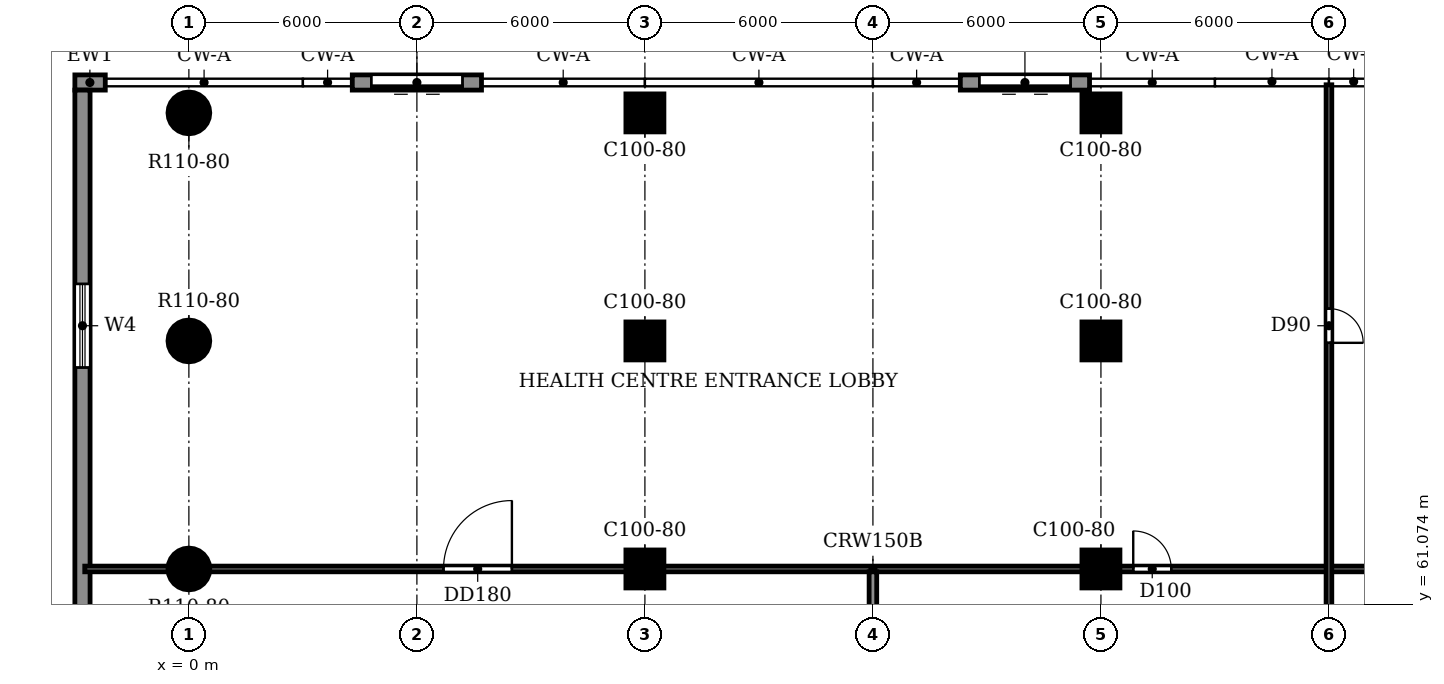
"""IFC4 building model, lengths in metres.
Left out: names, types, materials, properties, quantities, classifications, styles, units other than length and angle.
Written with IfcOpenShell. Run it as: python <this file> out.ifc"""

import sys

from ifc_helpers import new_model, si_unit, direction, frame, frame_2d, origin, origin_2d, place, context, subcontext, project, spatial, rectangle, circle, extrude, source, transform, mapped, element, fill, save


model = new_model("IFC4")
c1 = context("Model", 3, precision=1e-05, world=origin(), true_north=direction((0.0, 1.0)))
c2 = subcontext(c1, "Body", "Model", "MODEL_VIEW")
j1 = project(units=[si_unit("LENGTHUNIT", "METRE"), si_unit("PLANEANGLEUNIT", "RADIAN")], contexts=[c1])
p1 = place(None, origin())
s1 = spatial("IfcSite", under=j1, at=p1, CompositionType="ELEMENT")
p2 = place(p1, origin())
s2 = spatial("IfcBuilding", under=s1, at=p2, CompositionType="ELEMENT")
p3 = place(p2, origin())
s3 = spatial("IfcBuildingStorey", under=s2, at=p3, CompositionType="ELEMENT", Elevation=0.0)
m1 = source(origin(), c2, "Body", "SweptSolid", [
    extrude(circle(Radius=0.55, at=origin_2d()), origin(), (0.0, 0.0, 1.0), 5.98),
])
p4 = place(p3, frame((0.0, 74.0, -0.3), z_axis=(0.0, 0.0, 1.0), x_axis=(1.0, 0.0, 0.0)))
e1 = element("IfcColumn", 1, at=p4, inside=s3, PredefinedType="COLUMN", context=c2, shape_type="MappedRepresentation", body=[
    mapped(m1, transform((0.0, 0.0, 0.0))),
])
m2 = source(origin(), c2, "Body", "SweptSolid", [
    extrude(rectangle(XDim=1.0, YDim=1.0, at=origin_2d()), origin(), (0.0, 0.0, 1.0), 5.98),
])
for number, where, z_axis, x_axis in (
    (2, (12.0, 74.0, -0.3), (0.0, 0.0, 1.0), (1.0, 0.0, 0.0)),
    (3, (24.0, 74.0, -0.3), (0.0, 0.0, 1.0), (1.0, 0.0, 0.0)),
):
    element("IfcColumn", number, at=place(p3, frame(where, z_axis=z_axis, x_axis=x_axis)), inside=s3, PredefinedType="COLUMN", context=c2, shape_type="MappedRepresentation", body=[
        mapped(m2, transform((0.0, 0.0, 0.0))),
    ])
p5 = place(p3, frame((0.0, 68.0, -0.3), z_axis=(0.0, 0.0, 1.0), x_axis=(1.0, 0.0, 0.0)))
e4 = element("IfcColumn", 4, at=p5, inside=s3, PredefinedType="COLUMN", context=c2, shape_type="MappedRepresentation", body=[
    mapped(m1, transform((0.0, 0.0, 0.0))),
])
for number, where, z_axis, x_axis in (
    (5, (12.0, 68.0, -0.3), (0.0, 0.0, 1.0), (1.0, 0.0, 0.0)),
    (6, (24.0, 68.0, -0.3), (0.0, 0.0, 1.0), (1.0, 0.0, 0.0)),
):
    element("IfcColumn", number, at=place(p3, frame(where, z_axis=z_axis, x_axis=x_axis)), inside=s3, PredefinedType="COLUMN", context=c2, shape_type="MappedRepresentation", body=[
        mapped(m2, transform((0.0, 0.0, 0.0))),
    ])
p6 = place(p3, frame((0.0, 62.0, -0.3), z_axis=(0.0, 0.0, 1.0), x_axis=(1.0, 0.0, 0.0)))
e7 = element("IfcColumn", 7, at=p6, inside=s3, PredefinedType="COLUMN", context=c2, shape_type="MappedRepresentation", body=[
    mapped(m1, transform((0.0, 0.0, 0.0))),
])
for number, where, z_axis, x_axis in (
    (8, (12.0, 62.0, -0.3), (0.0, 0.0, 1.0), (1.0, 0.0, 0.0)),
    (9, (24.0, 62.0, -0.3), (0.0, 0.0, 1.0), (1.0, 0.0, 0.0)),
):
    element("IfcColumn", number, at=place(p3, frame(where, z_axis=z_axis, x_axis=x_axis)), inside=s3, PredefinedType="COLUMN", context=c2, shape_type="MappedRepresentation", body=[
        mapped(m2, transform((0.0, 0.0, 0.0))),
    ])
p7 = place(p3, frame((23.7, 74.8, 0.0), z_axis=(0.0, 0.0, 1.0), x_axis=(-1.0, 0.0, 0.0)))
e10 = element("IfcWall", 10, at=p7, inside=s3, PredefinedType="STANDARD", context=c2, shape_type="SweptSolid", body=[
    extrude(rectangle(XDim=3.4, YDim=0.4, at=frame_2d((1.7, 0.0))), origin(), (0.0, 0.0, 1.0), 5.68),
])
p8 = place(p7, frame((0.5, 0.0, 0.0)))
e11 = element("IfcOpeningElement", 11, at=p8, cuts=e10, PredefinedType="OPENING", context=c2, shape_type="SweptSolid", body=[
    extrude(rectangle(XDim=2.4, YDim=2.4, at=frame_2d((1.2, 1.2))), frame((0.0, 0.21, 0.0), z_axis=(0.0, -1.0, 0.0), x_axis=(1.0, 0.0, 0.0)), (0.0, 0.0, 1.0), 0.42),
])
p9 = place(p3, frame((7.7, 74.8, 0.0), z_axis=(0.0, 0.0, 1.0), x_axis=(-1.0, 0.0, 0.0)))
e12 = element("IfcWall", 12, at=p9, inside=s3, PredefinedType="STANDARD", context=c2, shape_type="SweptSolid", body=[
    extrude(rectangle(XDim=3.4, YDim=0.4, at=frame_2d((1.7, 0.0))), origin(), (0.0, 0.0, 1.0), 5.68),
])
p10 = place(p9, frame((0.5, 0.0, 0.0)))
e13 = element("IfcOpeningElement", 13, at=p10, cuts=e12, PredefinedType="OPENING", context=c2, shape_type="SweptSolid", body=[
    extrude(rectangle(XDim=2.4, YDim=2.4, at=frame_2d((1.2, 1.2))), frame((0.0, 0.21, 0.0), z_axis=(0.0, -1.0, 0.0), x_axis=(1.0, 0.0, 0.0)), (0.0, 0.0, 1.0), 0.42),
])
p11 = place(p3, frame((-2.2, 74.8, 0.0), z_axis=(0.0, 0.0, 1.0), x_axis=(-1.0, 0.0, 0.0)))
e14 = element("IfcWall", 14, at=p11, inside=s3, PredefinedType="STANDARD", context=c2, shape_type="SweptSolid", body=[
    extrude(rectangle(XDim=0.8, YDim=0.4, at=frame_2d((0.4, 0.0))), origin(), (0.0, 0.0, 1.0), 5.68),
])
p12 = place(p3, frame((-2.8, 74.6, 0.0), z_axis=(0.0, 0.0, 1.0), x_axis=(0.0, -1.0, 0.0)))
e15 = element("IfcWall", 15, at=p12, inside=s3, PredefinedType="STANDARD", context=c2, shape_type="SweptSolid", body=[
    extrude(rectangle(XDim=74.4, YDim=0.4, at=frame_2d((37.2, 0.0))), origin(), (0.0, 0.0, 1.0), 5.68),
])
p13 = place(p12, frame((5.1, 0.0, 0.9)))
e16 = element("IfcOpeningElement", 16, at=p13, cuts=e15, PredefinedType="OPENING", context=c2, shape_type="SweptSolid", body=[
    extrude(rectangle(XDim=2.2, YDim=2.7, at=frame_2d((1.1, 1.35))), frame((0.0, 0.21, 0.0), z_axis=(0.0, -1.0, 0.0), x_axis=(1.0, 0.0, 0.0)), (0.0, 0.0, 1.0), 0.42),
])
p14 = place(p12, frame((34.7, 0.0, 0.9)))
e17 = element("IfcOpeningElement", 17, at=p14, cuts=e15, PredefinedType="OPENING", context=c2, shape_type="SweptSolid", body=[
    extrude(rectangle(XDim=2.2, YDim=2.7, at=frame_2d((1.1, 1.35))), frame((0.0, 0.21, 0.0), z_axis=(0.0, -1.0, 0.0), x_axis=(1.0, 0.0, 0.0)), (0.0, 0.0, 1.0), 0.42),
])
p15 = place(p12, frame((20.1, 0.0, 0.9)))
e18 = element("IfcOpeningElement", 18, at=p15, cuts=e15, PredefinedType="OPENING", context=c2, shape_type="SweptSolid", body=[
    extrude(rectangle(XDim=2.2, YDim=2.7, at=frame_2d((1.1, 1.35))), frame((0.0, 0.21, 0.0), z_axis=(0.0, -1.0, 0.0), x_axis=(1.0, 0.0, 0.0)), (0.0, 0.0, 1.0), 0.42),
])
p16 = place(p12, frame((42.0, 0.0, 0.0)))
e19 = element("IfcOpeningElement", 19, at=p16, cuts=e15, PredefinedType="OPENING", context=c2, shape_type="SweptSolid", body=[
    extrude(rectangle(XDim=2.0, YDim=2.4, at=frame_2d((1.0, 1.2))), frame((0.0, 0.21, 0.0), z_axis=(0.0, -1.0, 0.0), x_axis=(1.0, 0.0, 0.0)), (0.0, 0.0, 1.0), 0.42),
])
p17 = place(p12, frame((57.7, 0.0, 0.0)))
e20 = element("IfcOpeningElement", 20, at=p17, cuts=e15, PredefinedType="OPENING", context=c2, shape_type="SweptSolid", body=[
    extrude(rectangle(XDim=2.0, YDim=2.4, at=frame_2d((1.0, 1.2))), frame((0.0, 0.21, 0.0), z_axis=(0.0, -1.0, 0.0), x_axis=(1.0, 0.0, 0.0)), (0.0, 0.0, 1.0), 0.42),
])
p18 = place(p3, frame((-2.74, 62.0, 0.0), z_axis=(0.0, 0.0, 1.0), x_axis=(1.0, 0.0, 0.0)))
e21 = element("IfcWall", 21, at=p18, inside=s3, PredefinedType="PARTITIONING", context=c2, shape_type="SweptSolid", body=[
    extrude(rectangle(XDim=50.665, YDim=0.15, at=frame_2d((25.333, 0.0))), origin(), (0.0, 0.0, 1.0), 5.68),
])
p19 = place(p18, frame((9.44, 0.0, 0.0)))
e22 = element("IfcOpeningElement", 22, at=p19, cuts=e21, PredefinedType="OPENING", context=c2, shape_type="SweptSolid", body=[
    extrude(rectangle(XDim=1.8, YDim=2.1, at=frame_2d((0.9, 1.05))), frame((0.0, 0.085, 0.0), z_axis=(0.0, -1.0, 0.0), x_axis=(1.0, 0.0, 0.0)), (0.0, 0.0, 1.0), 0.17),
])
p20 = place(p18, frame((27.59, 0.0, 0.0)))
e23 = element("IfcOpeningElement", 23, at=p20, cuts=e21, PredefinedType="OPENING", context=c2, shape_type="SweptSolid", body=[
    extrude(rectangle(XDim=1.0, YDim=2.1, at=frame_2d((0.5, 1.05))), frame((0.0, 0.085, 0.0), z_axis=(0.0, -1.0, 0.0), x_axis=(1.0, 0.0, 0.0)), (0.0, 0.0, 1.0), 0.17),
])
p21 = place(p18, frame((40.84, 0.0, 0.0)))
e24 = element("IfcOpeningElement", 24, at=p21, cuts=e21, PredefinedType="OPENING", context=c2, shape_type="SweptSolid", body=[
    extrude(rectangle(XDim=1.8, YDim=2.1, at=frame_2d((0.9, 1.05))), frame((0.0, 0.085, 0.0), z_axis=(0.0, -1.0, 0.0), x_axis=(1.0, 0.0, 0.0)), (0.0, 0.0, 1.0), 0.17),
])
p22 = place(p3, frame((30.0, 38.1, 0.0), z_axis=(0.0, 0.0, 1.0), x_axis=(0.0, 1.0, 0.0)))
e25 = element("IfcWall", 25, at=p22, inside=s3, PredefinedType="PARTITIONING", context=c2, shape_type="SweptSolid", body=[
    extrude(rectangle(XDim=36.64, YDim=0.15, at=frame_2d((18.32, 0.0))), origin(), (0.0, 0.0, 1.0), 5.68),
])
p23 = place(p22, frame((29.85, 0.0, 0.0)))
e26 = element("IfcOpeningElement", 26, at=p23, cuts=e25, PredefinedType="OPENING", context=c2, shape_type="SweptSolid", body=[
    extrude(rectangle(XDim=0.9, YDim=2.1, at=frame_2d((0.45, 1.05))), frame((0.0, 0.085, 0.0), z_axis=(0.0, -1.0, 0.0), x_axis=(1.0, 0.0, 0.0)), (0.0, 0.0, 1.0), 0.17),
])
p24 = place(p3, frame((18.0, 38.535, 0.0), z_axis=(0.0, 0.0, 1.0), x_axis=(0.0, 1.0, 0.0)))
e27 = element("IfcWall", 27, at=p24, inside=s3, PredefinedType="PARTITIONING", context=c2, shape_type="SweptSolid", body=[
    extrude(rectangle(XDim=23.39, YDim=0.2, at=frame_2d((11.695, 0.0))), origin(), (0.0, 0.0, 1.0), 5.68),
])
p25 = place(p13, origin())
e28 = element("IfcWindow", 28, at=p25, inside=s3, PartitioningType="DOUBLE_PANEL_HORIZONTAL", PredefinedType="WINDOW", context=c2, shape_type="SweptSolid", body=[
    extrude(rectangle(XDim=2.2, YDim=2.7, at=frame_2d((1.1, 1.35))), frame((0.0, 0.03, 0.0), z_axis=(0.0, -1.0, 0.0), x_axis=(1.0, 0.0, 0.0)), (0.0, 0.0, 1.0), 0.06),
])
fill(e16, e28)
p26 = place(p10, origin())
e29 = element("IfcDoor", 29, at=p26, inside=s3, OperationType="DOUBLE_DOOR_SLIDING", PredefinedType="DOOR", context=c2, shape_type="SweptSolid", body=[
    extrude(rectangle(XDim=2.4, YDim=2.4, at=frame_2d((1.2, 1.2))), frame((0.0, 0.025, 0.0), z_axis=(0.0, -1.0, 0.0), x_axis=(1.0, 0.0, 0.0)), (0.0, 0.0, 1.0), 0.05),
])
fill(e13, e29)
p27 = place(p19, origin())
e30 = element("IfcDoor", 30, at=p27, inside=s3, OperationType="DOUBLE_DOOR_SINGLE_SWING", PredefinedType="DOOR", context=c2, shape_type="SweptSolid", body=[
    extrude(rectangle(XDim=1.8, YDim=2.1, at=frame_2d((0.9, 1.05))), frame((0.0, 0.025, 0.0), z_axis=(0.0, -1.0, 0.0), x_axis=(1.0, 0.0, 0.0)), (0.0, 0.0, 1.0), 0.05),
])
fill(e22, e30)
p28 = place(p8, origin())
e31 = element("IfcDoor", 31, at=p28, inside=s3, OperationType="DOUBLE_DOOR_SLIDING", PredefinedType="DOOR", context=c2, shape_type="SweptSolid", body=[
    extrude(rectangle(XDim=2.4, YDim=2.4, at=frame_2d((1.2, 1.2))), frame((0.0, 0.025, 0.0), z_axis=(0.0, -1.0, 0.0), x_axis=(1.0, 0.0, 0.0)), (0.0, 0.0, 1.0), 0.05),
])
fill(e11, e31)
p29 = place(p20, origin())
e32 = element("IfcDoor", 32, at=p29, inside=s3, OperationType="SINGLE_SWING_LEFT", PredefinedType="DOOR", context=c2, shape_type="SweptSolid", body=[
    extrude(rectangle(XDim=1.0, YDim=2.1, at=frame_2d((0.5, 1.05))), frame((0.0, 0.025, 0.0), z_axis=(0.0, -1.0, 0.0), x_axis=(1.0, 0.0, 0.0)), (0.0, 0.0, 1.0), 0.05),
])
fill(e23, e32)
p30 = place(p23, frame((0.9, 0.0, 0.0), z_axis=(0.0, 0.0, 1.0), x_axis=(-1.0, 0.0, 0.0)))
e33 = element("IfcDoor", 33, at=p30, inside=s3, OperationType="SINGLE_SWING_RIGHT", PredefinedType="DOOR", context=c2, shape_type="SweptSolid", body=[
    extrude(rectangle(XDim=0.9, YDim=2.1, at=frame_2d((0.45, 1.05))), frame((0.0, 0.025, 0.0), z_axis=(0.0, -1.0, 0.0), x_axis=(1.0, 0.0, 0.0)), (0.0, 0.0, 1.0), 0.05),
])
fill(e26, e33)
save(model, sys.argv[1])
